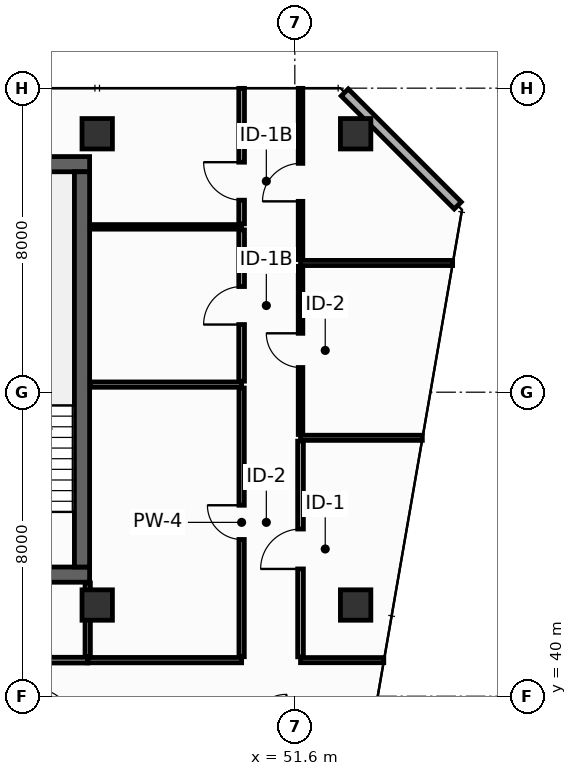
"""IFC4 building model, lengths in metres.
Left out: names, types, materials, properties, quantities, classifications, styles, units other than length and angle.
Written with IfcOpenShell. Run it as: python <this file> out.ifc"""

import sys

from ifc_helpers import new_model, si_unit, direction, frame, frame_2d, origin, origin_2d, place, context, subcontext, project, spatial, rectangle, hollow_rectangle, extrude, element, fill, save


model = new_model("IFC4")
c1 = context("Model", 3, precision=1e-05, world=origin(), true_north=direction((0.0, 1.0)))
c2 = subcontext(c1, "Body", "Model", "MODEL_VIEW")
j1 = project(units=[si_unit("LENGTHUNIT", "METRE"), si_unit("PLANEANGLEUNIT", "RADIAN")], contexts=[c1])
p1 = place(None, origin())
s1 = spatial("IfcSite", under=j1, at=p1, CompositionType="ELEMENT")
p2 = place(p1, origin())
s2 = spatial("IfcBuilding", under=s1, at=p2, CompositionType="ELEMENT")
p3 = place(p2, frame((0.0, 0.0, 234.4)))
s3 = spatial("IfcBuildingStorey", under=s2, at=p3, CompositionType="ELEMENT", Elevation=234.4)
p4 = place(p3, frame((13.7, 43.2, 0.0), z_axis=(0.0, 0.0, 1.0), x_axis=(1.0, 0.0, 0.0)))
e1 = element("IfcWall", 1, at=p4, inside=s3, PredefinedType="SHEAR", context=c2, shape_type="SweptSolid", body=[
    extrude(rectangle(XDim=32.5, YDim=0.4, at=frame_2d((16.25, 0.0))), origin(), (0.0, 0.0, 1.0), 3.55),
])
p5 = place(p4, frame((5.4, 0.0, 0.0)))
e2 = element("IfcOpeningElement", 2, at=p5, cuts=e1, PredefinedType="OPENING", context=c2, shape_type="SweptSolid", body=[
    extrude(rectangle(XDim=1.1, YDim=2.15, at=frame_2d((0.55, 1.075))), frame((0.0, 0.21, 0.0), z_axis=(0.0, -1.0, 0.0), x_axis=(1.0, 0.0, 0.0)), (0.0, 0.0, 1.0), 0.42),
])
p6 = place(p4, frame((25.6, 0.0, 0.0)))
e3 = element("IfcOpeningElement", 3, at=p6, cuts=e1, PredefinedType="OPENING", context=c2, shape_type="SweptSolid", body=[
    extrude(rectangle(XDim=1.1, YDim=2.15, at=frame_2d((0.55, 1.075))), frame((0.0, 0.21, 0.0), z_axis=(0.0, -1.0, 0.0), x_axis=(1.0, 0.0, 0.0)), (0.0, 0.0, 1.0), 0.42),
])
p7 = place(p3, frame((13.7, 54.0, 0.0), z_axis=(0.0, 0.0, 1.0), x_axis=(1.0, 0.0, 0.0)))
e4 = element("IfcWall", 4, at=p7, inside=s3, PredefinedType="SHEAR", context=c2, shape_type="SweptSolid", body=[
    extrude(rectangle(XDim=32.5, YDim=0.4, at=frame_2d((16.25, 0.0))), origin(), (0.0, 0.0, 1.0), 3.55),
])
p8 = place(p3, frame((46.0, 43.4, 0.0), z_axis=(0.0, 0.0, 1.0), x_axis=(0.0, 1.0, 0.0)))
e5 = element("IfcWall", 5, at=p8, inside=s3, PredefinedType="SHEAR", context=c2, shape_type="SweptSolid", body=[
    extrude(rectangle(XDim=10.4, YDim=0.4, at=frame_2d((5.2, 0.0))), origin(), (0.0, 0.0, 1.0), 3.55),
])
for number, where, z_axis, x_axis in (
    (6, (46.4, 54.8, 0.0), (0.0, 0.0, 1.0), (1.0, 0.0, 0.0)),
    (7, (53.2, 54.8, 0.0), (0.0, 0.0, 1.0), (1.0, 0.0, 0.0)),
    (8, (46.4, 42.4, 0.0), (0.0, 0.0, 1.0), (1.0, 0.0, 0.0)),
    (9, (53.2, 42.4, 0.0), (0.0, 0.0, 1.0), (1.0, 0.0, 0.0)),
):
    element("IfcColumn", number, at=place(p3, frame(where, z_axis=z_axis, x_axis=x_axis)), inside=s3, PredefinedType="COLUMN", context=c2, shape_type="SweptSolid", body=[
        extrude(hollow_rectangle(XDim=0.8, YDim=0.8, WallThickness=0.036, at=origin_2d()), origin(), (0.0, 0.0, 1.0), 3.8),
    ])
p9 = place(p3, frame((55.887, 52.913, 0.0), z_axis=(0.0, 0.0, 1.0), x_axis=(-0.707106781187, 0.707106781187, 0.0)))
e10 = element("IfcWall", 10, at=p9, inside=s3, PredefinedType="STANDARD", context=c2, shape_type="SweptSolid", body=[
    extrude(rectangle(XDim=4.206, YDim=0.26, at=frame_2d((2.103, 0.0))), origin(), (0.0, 0.0, 1.0), 3.55),
])
p10 = place(p3, frame((46.15, 40.95, 0.0), z_axis=(0.0, 0.0, 1.0), x_axis=(1.0, 0.0, 0.0)))
e11 = element("IfcWall", 11, at=p10, inside=s3, PredefinedType="PARTITIONING", context=c2, shape_type="SweptSolid", body=[
    extrude(rectangle(XDim=4.05, YDim=0.14, at=frame_2d((2.025, 0.0))), origin(), (0.0, 0.0, 1.0), 3.55),
])
p11 = place(p3, frame((46.15, 41.04, 0.0), z_axis=(0.0, 0.0, 1.0), x_axis=(0.0, 1.0, 0.0)))
e12 = element("IfcWall", 12, at=p11, inside=s3, PredefinedType="PARTITIONING", context=c2, shape_type="SweptSolid", body=[
    extrude(rectangle(XDim=1.94, YDim=0.14, at=frame_2d((0.97, 0.0))), origin(), (0.0, 0.0, 1.0), 3.55),
])
p12 = place(p3, frame((46.22, 48.2, 0.0), z_axis=(0.0, 0.0, 1.0), x_axis=(1.0, 0.0, 0.0)))
e13 = element("IfcWall", 13, at=p12, inside=s3, PredefinedType="PARTITIONING", context=c2, shape_type="SweptSolid", body=[
    extrude(rectangle(XDim=3.98, YDim=0.14, at=frame_2d((1.99, 0.0))), origin(), (0.0, 0.0, 1.0), 3.55),
])
p13 = place(p3, frame((50.2, 41.04, 0.0), z_axis=(0.0, 0.0, 1.0), x_axis=(0.0, 1.0, 0.0)))
e14 = element("IfcWall", 14, at=p13, inside=s3, PredefinedType="PARTITIONING", context=c2, shape_type="SweptSolid", body=[
    extrude(rectangle(XDim=7.07, YDim=0.14, at=frame_2d((3.535, 0.0))), origin(), (0.0, 0.0, 1.0), 2.947),
])
p14 = place(p13, frame((3.085, 0.0, 0.0)))
e15 = element("IfcOpeningElement", 15, at=p14, cuts=e14, PredefinedType="OPENING", context=c2, shape_type="SweptSolid", body=[
    extrude(rectangle(XDim=0.9, YDim=2.1, at=frame_2d((0.45, 1.05))), frame((0.0, 0.08, 0.0), z_axis=(0.0, -1.0, 0.0), x_axis=(1.0, 0.0, 0.0)), (0.0, 0.0, 1.0), 0.16),
])
p15 = place(p3, frame((46.22, 52.35, 0.0), z_axis=(0.0, 0.0, 1.0), x_axis=(1.0, 0.0, 0.0)))
e16 = element("IfcWall", 16, at=p15, inside=s3, PredefinedType="PARTITIONING", context=c2, shape_type="SweptSolid", body=[
    extrude(rectangle(XDim=3.98, YDim=0.12, at=frame_2d((1.99, 0.0))), origin(), (0.0, 0.0, 1.0), 3.55),
])
p16 = place(p3, frame((50.2, 48.29, 0.0), z_axis=(0.0, 0.0, 1.0), x_axis=(0.0, 1.0, 0.0)))
e17 = element("IfcWall", 17, at=p16, inside=s3, PredefinedType="PARTITIONING", context=c2, shape_type="SweptSolid", body=[
    extrude(rectangle(XDim=3.98, YDim=0.15, at=frame_2d((1.99, 0.0))), origin(), (0.0, 0.0, 1.0), 3.55),
])
p17 = place(p16, frame((1.49, 0.0, 0.0)))
e18 = element("IfcOpeningElement", 18, at=p17, cuts=e17, PredefinedType="OPENING", context=c2, shape_type="SweptSolid", body=[
    extrude(rectangle(XDim=1.0, YDim=2.15, at=frame_2d((0.5, 1.075))), frame((0.0, 0.085, 0.0), z_axis=(0.0, -1.0, 0.0), x_axis=(1.0, 0.0, 0.0)), (0.0, 0.0, 1.0), 0.17),
])
p18 = place(p3, frame((50.2, 52.43, 0.0), z_axis=(0.0, 0.0, 1.0), x_axis=(0.0, 1.0, 0.0)))
e19 = element("IfcWall", 19, at=p18, inside=s3, PredefinedType="PARTITIONING", context=c2, shape_type="SweptSolid", body=[
    extrude(rectangle(XDim=3.565, YDim=0.15, at=frame_2d((1.783, 0.0))), origin(), (0.0, 0.0, 1.0), 2.935),
])
p19 = place(p18, frame((0.622, 0.0, 0.0)))
e20 = element("IfcOpeningElement", 20, at=p19, cuts=e19, PredefinedType="OPENING", context=c2, shape_type="SweptSolid", body=[
    extrude(rectangle(XDim=1.0, YDim=2.15, at=frame_2d((0.5, 1.075))), frame((0.0, 0.085, 0.0), z_axis=(0.0, -1.0, 0.0), x_axis=(1.0, 0.0, 0.0)), (0.0, 0.0, 1.0), 0.17),
])
p20 = place(p3, frame((51.75, 40.95, 0.0), z_axis=(0.0, 0.0, 1.0), x_axis=(1.0, 0.0, 0.0)))
e21 = element("IfcWall", 21, at=p20, inside=s3, PredefinedType="PARTITIONING", context=c2, shape_type="SweptSolid", body=[
    extrude(rectangle(XDim=2.191, YDim=0.135, at=frame_2d((1.095, 0.0))), origin(), (0.0, 0.0, 1.0), 3.085),
])
p21 = place(p3, frame((51.75, 46.8, 0.0), z_axis=(0.0, 0.0, 1.0), x_axis=(1.0, 0.0, 0.0)))
e22 = element("IfcWall", 22, at=p21, inside=s3, PredefinedType="PARTITIONING", context=c2, shape_type="SweptSolid", body=[
    extrude(rectangle(XDim=3.205, YDim=0.135, at=frame_2d((1.603, 0.0))), origin(), (0.0, 0.0, 1.0), 2.947),
])
p22 = place(p3, frame((51.75, 51.4, 0.0), z_axis=(0.0, 0.0, 1.0), x_axis=(1.0, 0.0, 0.0)))
e23 = element("IfcWall", 23, at=p22, inside=s3, PredefinedType="PARTITIONING", context=c2, shape_type="SweptSolid", body=[
    extrude(rectangle(XDim=4.002, YDim=0.135, at=frame_2d((2.001, 0.0))), origin(), (0.0, 0.0, 1.0), 2.947),
])
p23 = place(p3, frame((51.75, 41.038, 0.0), z_axis=(0.0, 0.0, 1.0), x_axis=(0.0, 1.0, 0.0)))
e24 = element("IfcWall", 24, at=p23, inside=s3, PredefinedType="PARTITIONING", context=c2, shape_type="SweptSolid", body=[
    extrude(rectangle(XDim=5.675, YDim=0.15, at=frame_2d((2.837, 0.0))), origin(), (0.0, 0.0, 1.0), 2.947),
])
p24 = place(p23, frame((2.312, 0.0, 0.0)))
e25 = element("IfcOpeningElement", 25, at=p24, cuts=e24, PredefinedType="OPENING", context=c2, shape_type="SweptSolid", body=[
    extrude(rectangle(XDim=1.05, YDim=2.15, at=frame_2d((0.525, 1.075))), frame((0.0, 0.085, 0.0), z_axis=(0.0, -1.0, 0.0), x_axis=(1.0, 0.0, 0.0)), (0.0, 0.0, 1.0), 0.17),
])
p25 = place(p3, frame((51.75, 46.887, 0.0), z_axis=(0.0, 0.0, 1.0), x_axis=(0.0, 1.0, 0.0)))
e26 = element("IfcWall", 26, at=p25, inside=s3, PredefinedType="PARTITIONING", context=c2, shape_type="SweptSolid", body=[
    extrude(rectangle(XDim=4.425, YDim=0.12, at=frame_2d((2.212, 0.0))), origin(), (0.0, 0.0, 1.0), 3.55),
])
p26 = place(p25, frame((1.762, 0.0, 0.0)))
e27 = element("IfcOpeningElement", 27, at=p26, cuts=e26, PredefinedType="OPENING", context=c2, shape_type="SweptSolid", body=[
    extrude(rectangle(XDim=0.9, YDim=2.1, at=frame_2d((0.45, 1.05))), frame((0.0, 0.07, 0.0), z_axis=(0.0, -1.0, 0.0), x_axis=(1.0, 0.0, 0.0)), (0.0, 0.0, 1.0), 0.14),
])
p27 = place(p3, frame((51.75, 51.488, 0.0), z_axis=(0.0, 0.0, 1.0), x_axis=(0.0, 1.0, 0.0)))
e28 = element("IfcWall", 28, at=p27, inside=s3, PredefinedType="PARTITIONING", context=c2, shape_type="SweptSolid", body=[
    extrude(rectangle(XDim=4.508, YDim=0.12, at=frame_2d((2.254, 0.0))), origin(), (0.0, 0.0, 1.0), 2.935),
])
p28 = place(p27, frame((1.534, 0.0, 0.0)))
e29 = element("IfcOpeningElement", 29, at=p28, cuts=e28, PredefinedType="OPENING", context=c2, shape_type="SweptSolid", body=[
    extrude(rectangle(XDim=1.0, YDim=2.15, at=frame_2d((0.5, 1.075))), frame((0.0, 0.07, 0.0), z_axis=(0.0, -1.0, 0.0), x_axis=(1.0, 0.0, 0.0)), (0.0, 0.0, 1.0), 0.14),
])
p29 = place(p3, frame((40.995, 40.95, 0.0), z_axis=(0.0, 0.0, 1.0), x_axis=(1.0, 0.0, 0.0)))
e30 = element("IfcWall", 30, at=p29, inside=s3, PredefinedType="PARTITIONING", context=c2, shape_type="SweptSolid", body=[
    extrude(rectangle(XDim=5.155, YDim=0.15, at=frame_2d((2.577, 0.0))), origin(), (0.0, 0.0, 1.0), 3.55),
])
p30 = place(p29, frame((2.078, 0.0, 0.0)))
e31 = element("IfcOpeningElement", 31, at=p30, cuts=e30, PredefinedType="OPENING", context=c2, shape_type="SweptSolid", body=[
    extrude(rectangle(XDim=1.0, YDim=2.15, at=frame_2d((0.5, 1.075))), frame((0.0, 0.085, 0.0), z_axis=(0.0, -1.0, 0.0), x_axis=(1.0, 0.0, 0.0)), (0.0, 0.0, 1.0), 0.17),
])
p31 = place(p14, origin())
e32 = element("IfcDoor", 32, at=p31, inside=s3, OperationType="SINGLE_SWING_RIGHT", PredefinedType="DOOR", context=c2, shape_type="SweptSolid", body=[
    extrude(rectangle(XDim=0.9, YDim=2.1, at=frame_2d((0.45, 1.05))), frame((0.0, 0.025, 0.0), z_axis=(0.0, -1.0, 0.0), x_axis=(1.0, 0.0, 0.0)), (0.0, 0.0, 1.0), 0.05),
])
fill(e15, e32)
p32 = place(p17, origin())
e33 = element("IfcDoor", 33, at=p32, inside=s3, OperationType="SINGLE_SWING_LEFT", PredefinedType="DOOR", context=c2, shape_type="SweptSolid", body=[
    extrude(rectangle(XDim=1.0, YDim=2.15, at=frame_2d((0.5, 1.075))), frame((0.0, 0.025, 0.0), z_axis=(0.0, -1.0, 0.0), x_axis=(1.0, 0.0, 0.0)), (0.0, 0.0, 1.0), 0.05),
])
fill(e18, e33)
p33 = place(p19, origin())
e34 = element("IfcDoor", 34, at=p33, inside=s3, OperationType="SINGLE_SWING_RIGHT", PredefinedType="DOOR", context=c2, shape_type="SweptSolid", body=[
    extrude(rectangle(XDim=1.0, YDim=2.15, at=frame_2d((0.5, 1.075))), frame((0.0, 0.025, 0.0), z_axis=(0.0, -1.0, 0.0), x_axis=(1.0, 0.0, 0.0)), (0.0, 0.0, 1.0), 0.05),
])
fill(e20, e34)
p34 = place(p24, origin())
e35 = element("IfcDoor", 35, at=p34, inside=s3, OperationType="SINGLE_SWING_LEFT", PredefinedType="DOOR", context=c2, shape_type="SweptSolid", body=[
    extrude(rectangle(XDim=1.05, YDim=2.15, at=frame_2d((0.525, 1.075))), frame((0.0, 0.025, 0.0), z_axis=(0.0, -1.0, 0.0), x_axis=(1.0, 0.0, 0.0)), (0.0, 0.0, 1.0), 0.05),
])
fill(e25, e35)
p35 = place(p26, origin())
e36 = element("IfcDoor", 36, at=p35, inside=s3, OperationType="SINGLE_SWING_RIGHT", PredefinedType="DOOR", context=c2, shape_type="SweptSolid", body=[
    extrude(rectangle(XDim=0.9, YDim=2.1, at=frame_2d((0.45, 1.05))), frame((0.0, 0.025, 0.0), z_axis=(0.0, -1.0, 0.0), x_axis=(1.0, 0.0, 0.0)), (0.0, 0.0, 1.0), 0.05),
])
fill(e27, e36)
p36 = place(p28, origin())
e37 = element("IfcDoor", 37, at=p36, inside=s3, OperationType="SINGLE_SWING_LEFT", PredefinedType="DOOR", context=c2, shape_type="SweptSolid", body=[
    extrude(rectangle(XDim=1.0, YDim=2.15, at=frame_2d((0.5, 1.075))), frame((0.0, 0.025, 0.0), z_axis=(0.0, -1.0, 0.0), x_axis=(1.0, 0.0, 0.0)), (0.0, 0.0, 1.0), 0.05),
])
fill(e29, e37)
save(model, sys.argv[1])
